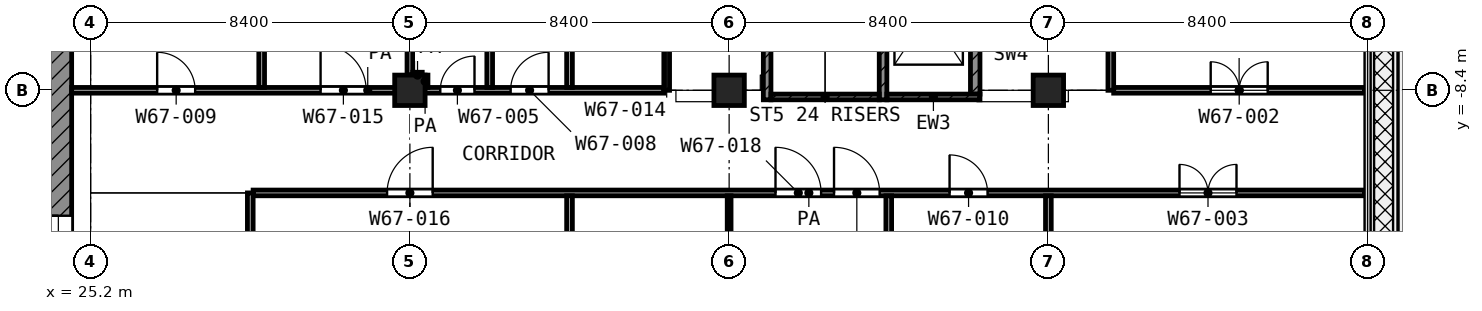
"""IFC4 building model, lengths in metres.
Left out: names, types, materials, properties, quantities, classifications, styles, units other than length and angle.
Written with IfcOpenShell. Run it as: python <this file> out.ifc"""

import sys

from ifc_helpers import new_model, si_unit, direction, frame, frame_2d, origin, origin_2d, place, context, subcontext, project, spatial, rectangle, extrude, element, fill, save


model = new_model("IFC4")
c1 = context("Model", 3, precision=1e-05, world=origin(), true_north=direction((0.0, 1.0)))
c2 = subcontext(c1, "Body", "Model", "MODEL_VIEW")
j1 = project(units=[si_unit("LENGTHUNIT", "METRE"), si_unit("PLANEANGLEUNIT", "RADIAN")], contexts=[c1])
p1 = place(None, origin())
s1 = spatial("IfcSite", under=j1, at=p1, CompositionType="ELEMENT")
p2 = place(p1, origin())
s2 = spatial("IfcBuilding", under=s1, at=p2, CompositionType="ELEMENT")
p3 = place(p2, frame((0.0, 0.0, 311.2)))
s3 = spatial("IfcBuildingStorey", under=s2, at=p3, CompositionType="ELEMENT", Elevation=311.2)
for number, where, z_axis, x_axis in (
    (1, (33.6, -8.4, 0.0), (0.0, 0.0, 1.0), (1.0, 0.0, 0.0)),
    (2, (42.0, -8.4, 0.0), (0.0, 0.0, 1.0), (1.0, 0.0, 0.0)),
    (3, (50.4, -8.4, 0.0), (0.0, 0.0, 1.0), (1.0, 0.0, 0.0)),
):
    element("IfcColumn", number, at=place(p3, frame(where, z_axis=z_axis, x_axis=x_axis)), inside=s3, PredefinedType="COLUMN", context=c2, shape_type="SweptSolid", body=[
        extrude(rectangle(XDim=0.8, YDim=0.8, at=origin_2d()), origin(), (0.0, 0.0, 1.0), 4.2),
    ])
p4 = place(p3, frame((24.35, -24.0, 0.0), z_axis=(0.0, 0.0, 1.0), x_axis=(0.0, 1.0, 0.0)))
e4 = element("IfcWall", 4, at=p4, inside=s3, PredefinedType="SHEAR", context=c2, shape_type="SweptSolid", body=[
    extrude(rectangle(XDim=18.6, YDim=0.7, at=frame_2d((9.3, 0.0))), origin(), (0.0, 0.0, 1.0), 3.6),
])
p5 = place(p4, frame((10.5, 0.0, 0.0)))
e5 = element("IfcOpeningElement", 5, at=p5, cuts=e4, PredefinedType="OPENING", context=c2, shape_type="SweptSolid", body=[
    extrude(rectangle(XDim=1.8, YDim=2.1, at=frame_2d((0.9, 1.05))), frame((0.0, 0.36, 0.0), z_axis=(0.0, -1.0, 0.0), x_axis=(1.0, 0.0, 0.0)), (0.0, 0.0, 1.0), 0.72),
])
p6 = place(p3, frame((43.0, -8.65, 0.0), z_axis=(0.0, 0.0, 1.0), x_axis=(0.0, 1.0, 0.0)))
e6 = element("IfcWall", 6, at=p6, inside=s3, PredefinedType="SHEAR", context=c2, shape_type="SweptSolid", body=[
    extrude(rectangle(XDim=8.35, YDim=0.2, at=frame_2d((4.175, 0.0))), origin(), (0.0, 0.0, 1.0), 3.6),
])
p7 = place(p6, frame((7.0, 0.0, 0.0)))
e7 = element("IfcOpeningElement", 7, at=p7, cuts=e6, PredefinedType="OPENING", context=c2, shape_type="SweptSolid", body=[
    extrude(rectangle(XDim=1.1, YDim=2.1, at=frame_2d((0.55, 1.05))), frame((0.0, 0.11, 0.0), z_axis=(0.0, -1.0, 0.0), x_axis=(1.0, 0.0, 0.0)), (0.0, 0.0, 1.0), 0.22),
])
p8 = place(p3, frame((46.05, -8.65, 0.0), z_axis=(0.0, 0.0, 1.0), x_axis=(0.0, 1.0, 0.0)))
e8 = element("IfcWall", 8, at=p8, inside=s3, PredefinedType="SHEAR", context=c2, shape_type="SweptSolid", body=[
    extrude(rectangle(XDim=8.35, YDim=0.2, at=frame_2d((4.175, 0.0))), origin(), (0.0, 0.0, 1.0), 3.6),
])
p9 = place(p8, frame((7.0, 0.0, 0.0)))
e9 = element("IfcOpeningElement", 9, at=p9, cuts=e8, PredefinedType="OPENING", context=c2, shape_type="SweptSolid", body=[
    extrude(rectangle(XDim=1.1, YDim=2.1, at=frame_2d((0.55, 1.05))), frame((0.0, 0.11, 0.0), z_axis=(0.0, -1.0, 0.0), x_axis=(1.0, 0.0, 0.0)), (0.0, 0.0, 1.0), 0.22),
])
p10 = place(p3, frame((43.1, -8.575, 0.0), z_axis=(0.0, 0.0, 1.0), x_axis=(1.0, 0.0, 0.0)))
e10 = element("IfcWall", 10, at=p10, inside=s3, PredefinedType="SHEAR", context=c2, shape_type="SweptSolid", body=[
    extrude(rectangle(XDim=2.85, YDim=0.15, at=frame_2d((1.425, 0.0))), origin(), (0.0, 0.0, 1.0), 3.6),
])
p11 = place(p3, frame((46.15, -8.575, 0.0), z_axis=(0.0, 0.0, 1.0), x_axis=(1.0, 0.0, 0.0)))
e11 = element("IfcWall", 11, at=p11, inside=s3, PredefinedType="SHEAR", context=c2, shape_type="SweptSolid", body=[
    extrude(rectangle(XDim=2.45, YDim=0.15, at=frame_2d((1.225, 0.0))), origin(), (0.0, 0.0, 1.0), 3.6),
])
p12 = place(p3, frame((48.475, -8.5, 0.0), z_axis=(0.0, 0.0, 1.0), x_axis=(0.0, 1.0, 0.0)))
e12 = element("IfcWall", 12, at=p12, inside=s3, PredefinedType="SHEAR", context=c2, shape_type="SweptSolid", body=[
    extrude(rectangle(XDim=3.475, YDim=0.25, at=frame_2d((1.738, 0.0))), origin(), (0.0, 0.0, 1.0), 3.6),
])
p13 = place(p3, frame((42.0, -20.35, 0.0), z_axis=(0.0, 0.0, 1.0), x_axis=(0.0, 1.0, 0.0)))
e13 = element("IfcWall", 13, at=p13, inside=s3, PredefinedType="PARTITIONING", context=c2, shape_type="SweptSolid", body=[
    extrude(rectangle(XDim=9.175, YDim=0.1, at=frame_2d((4.587, 0.0))), origin(), (0.0, 0.0, 1.0), 3.6),
])
p14 = place(p13, frame((4.1, 0.0, 0.0)))
e14 = element("IfcOpeningElement", 14, at=p14, cuts=e13, PredefinedType="OPENING", context=c2, shape_type="SweptSolid", body=[
    extrude(rectangle(XDim=1.0, YDim=2.1, at=frame_2d((0.5, 1.05))), frame((0.0, 0.06, 0.0), z_axis=(0.0, -1.0, 0.0), x_axis=(1.0, 0.0, 0.0)), (0.0, 0.0, 1.0), 0.12),
])
p15 = place(p3, frame((29.475, -11.1, 0.0), z_axis=(0.0, 0.0, 1.0), x_axis=(1.0, 0.0, 0.0)))
e15 = element("IfcWall", 15, at=p15, inside=s3, PredefinedType="PARTITIONING", context=c2, shape_type="SweptSolid", body=[
    extrude(rectangle(XDim=29.245, YDim=0.15, at=frame_2d((14.623, 0.0))), origin(), (0.0, 0.0, 1.0), 3.6),
])
p16 = place(p15, frame((3.525, 0.0, 0.0)))
e16 = element("IfcOpeningElement", 16, at=p16, cuts=e15, PredefinedType="OPENING", context=c2, shape_type="SweptSolid", body=[
    extrude(rectangle(XDim=1.2, YDim=2.1, at=frame_2d((0.6, 1.05))), frame((0.0, 0.085, 0.0), z_axis=(0.0, -1.0, 0.0), x_axis=(1.0, 0.0, 0.0)), (0.0, 0.0, 1.0), 0.17),
])
p17 = place(p15, frame((15.285, 0.0, 0.0)))
e17 = element("IfcOpeningElement", 17, at=p17, cuts=e15, PredefinedType="OPENING", context=c2, shape_type="SweptSolid", body=[
    extrude(rectangle(XDim=1.2, YDim=2.1, at=frame_2d((0.6, 1.05))), frame((0.0, 0.085, 0.0), z_axis=(0.0, -1.0, 0.0), x_axis=(1.0, 0.0, 0.0)), (0.0, 0.0, 1.0), 0.17),
])
p18 = place(p15, frame((13.745, 0.0, 0.0)))
e18 = element("IfcOpeningElement", 18, at=p18, cuts=e15, PredefinedType="OPENING", context=c2, shape_type="SweptSolid", body=[
    extrude(rectangle(XDim=1.2, YDim=2.1, at=frame_2d((0.6, 1.05))), frame((0.0, 0.085, 0.0), z_axis=(0.0, -1.0, 0.0), x_axis=(1.0, 0.0, 0.0)), (0.0, 0.0, 1.0), 0.17),
])
p19 = place(p15, frame((18.325, 0.0, 0.0)))
e19 = element("IfcOpeningElement", 19, at=p19, cuts=e15, PredefinedType="OPENING", context=c2, shape_type="SweptSolid", body=[
    extrude(rectangle(XDim=1.0, YDim=2.1, at=frame_2d((0.5, 1.05))), frame((0.0, 0.085, 0.0), z_axis=(0.0, -1.0, 0.0), x_axis=(1.0, 0.0, 0.0)), (0.0, 0.0, 1.0), 0.17),
])
p20 = place(p15, frame((24.375, 0.0, 0.0)))
e20 = element("IfcOpeningElement", 20, at=p20, cuts=e15, PredefinedType="OPENING", context=c2, shape_type="SweptSolid", body=[
    extrude(rectangle(XDim=1.5, YDim=2.1, at=frame_2d((0.75, 1.05))), frame((0.0, 0.085, 0.0), z_axis=(0.0, -1.0, 0.0), x_axis=(1.0, 0.0, 0.0)), (0.0, 0.0, 1.0), 0.17),
])
p21 = place(p3, frame((24.7, -8.4, 0.0), z_axis=(0.0, 0.0, 1.0), x_axis=(1.0, 0.0, 0.0)))
e21 = element("IfcWall", 21, at=p21, inside=s3, PredefinedType="PARTITIONING", context=c2, shape_type="SweptSolid", body=[
    extrude(rectangle(XDim=15.582, YDim=0.15, at=frame_2d((7.791, 0.0))), origin(), (0.0, 0.0, 1.0), 3.6),
])
p22 = place(p21, frame((2.25, 0.0, 0.0)))
e22 = element("IfcOpeningElement", 22, at=p22, cuts=e21, PredefinedType="OPENING", context=c2, shape_type="SweptSolid", body=[
    extrude(rectangle(XDim=1.0, YDim=2.1, at=frame_2d((0.5, 1.05))), frame((0.0, 0.085, 0.0), z_axis=(0.0, -1.0, 0.0), x_axis=(1.0, 0.0, 0.0)), (0.0, 0.0, 1.0), 0.17),
])
p23 = place(p21, frame((6.55, 0.0, 0.0)))
e23 = element("IfcOpeningElement", 23, at=p23, cuts=e21, PredefinedType="OPENING", context=c2, shape_type="SweptSolid", body=[
    extrude(rectangle(XDim=1.2, YDim=2.1, at=frame_2d((0.6, 1.05))), frame((0.0, 0.085, 0.0), z_axis=(0.0, -1.0, 0.0), x_axis=(1.0, 0.0, 0.0)), (0.0, 0.0, 1.0), 0.17),
])
p24 = place(p21, frame((9.7, 0.0, 0.0)))
e24 = element("IfcOpeningElement", 24, at=p24, cuts=e21, PredefinedType="OPENING", context=c2, shape_type="SweptSolid", body=[
    extrude(rectangle(XDim=0.9, YDim=2.1, at=frame_2d((0.45, 1.05))), frame((0.0, 0.085, 0.0), z_axis=(0.0, -1.0, 0.0), x_axis=(1.0, 0.0, 0.0)), (0.0, 0.0, 1.0), 0.17),
])
p25 = place(p21, frame((11.55, 0.0, 0.0)))
e25 = element("IfcOpeningElement", 25, at=p25, cuts=e21, PredefinedType="OPENING", context=c2, shape_type="SweptSolid", body=[
    extrude(rectangle(XDim=1.0, YDim=2.1, at=frame_2d((0.5, 1.05))), frame((0.0, 0.085, 0.0), z_axis=(0.0, -1.0, 0.0), x_axis=(1.0, 0.0, 0.0)), (0.0, 0.0, 1.0), 0.17),
])
p26 = place(p3, frame((52.118, -8.4, 0.0), z_axis=(0.0, 0.0, 1.0), x_axis=(1.0, 0.0, 0.0)))
e26 = element("IfcWall", 26, at=p26, inside=s3, PredefinedType="PARTITIONING", context=c2, shape_type="SweptSolid", body=[
    extrude(rectangle(XDim=6.602, YDim=0.15, at=frame_2d((3.301, 0.0))), origin(), (0.0, 0.0, 1.0), 3.6),
])
p27 = place(p26, frame((2.553, 0.0, 0.0)))
e27 = element("IfcOpeningElement", 27, at=p27, cuts=e26, PredefinedType="OPENING", context=c2, shape_type="SweptSolid", body=[
    extrude(rectangle(XDim=1.5, YDim=2.1, at=frame_2d((0.75, 1.05))), frame((0.0, 0.085, 0.0), z_axis=(0.0, -1.0, 0.0), x_axis=(1.0, 0.0, 0.0)), (0.0, 0.0, 1.0), 0.17),
])
p28 = place(p3, frame((33.677, -8.0, 0.0), z_axis=(0.0, 0.0, 1.0), x_axis=(1.0, 0.0, 0.0)))
e28 = element("IfcWall", 28, at=p28, inside=s3, PredefinedType="PARTITIONING", context=c2, shape_type="SweptSolid", body=[
    extrude(rectangle(XDim=0.248, YDim=0.15, at=frame_2d((0.124, 0.0))), origin(), (0.0, 0.0, 1.0), 3.6),
])
p29 = place(p3, frame((29.4, -31.198, 0.0), z_axis=(0.0, 0.0, 1.0), x_axis=(0.0, 1.0, 0.0)))
e29 = element("IfcWall", 29, at=p29, inside=s3, PredefinedType="PARTITIONING", context=c2, shape_type="SweptSolid", body=[
    extrude(rectangle(XDim=20.098, YDim=0.15, at=frame_2d((10.049, 0.0))), origin(), (0.0, 0.0, 1.0), 3.6),
])
p30 = place(p3, frame((29.7, -8.325, 0.0), z_axis=(0.0, 0.0, 1.0), x_axis=(0.0, 1.0, 0.0)))
e30 = element("IfcWall", 30, at=p30, inside=s3, PredefinedType="PARTITIONING", context=c2, shape_type="SweptSolid", body=[
    extrude(rectangle(XDim=8.245, YDim=0.15, at=frame_2d((4.123, 0.0))), origin(), (0.0, 0.0, 1.0), 3.6),
])
p31 = place(p3, frame((33.6, -7.998, 0.0), z_axis=(0.0, 0.0, 1.0), x_axis=(0.0, 1.0, 0.0)))
e31 = element("IfcWall", 31, at=p31, inside=s3, PredefinedType="PARTITIONING", context=c2, shape_type="SweptSolid", body=[
    extrude(rectangle(XDim=7.62, YDim=0.15, at=frame_2d((3.81, 0.0))), origin(), (0.0, 0.0, 1.0), 3.6),
])
p32 = place(p3, frame((34.0, -8.325, 0.0), z_axis=(0.0, 0.0, 1.0), x_axis=(0.0, 1.0, 0.0)))
e32 = element("IfcWall", 32, at=p32, inside=s3, PredefinedType="PARTITIONING", context=c2, shape_type="SweptSolid", body=[
    extrude(rectangle(XDim=0.325, YDim=0.15, at=frame_2d((0.163, 0.0))), origin(), (0.0, 0.0, 1.0), 3.6),
])
p33 = place(p3, frame((35.7, -8.325, 0.0), z_axis=(0.0, 0.0, 1.0), x_axis=(0.0, 1.0, 0.0)))
e33 = element("IfcWall", 33, at=p33, inside=s3, PredefinedType="PARTITIONING", context=c2, shape_type="SweptSolid", body=[
    extrude(rectangle(XDim=8.245, YDim=0.15, at=frame_2d((4.123, 0.0))), origin(), (0.0, 0.0, 1.0), 3.6),
])
p34 = place(p3, frame((37.8, -25.12, 0.0), z_axis=(0.0, 0.0, 1.0), x_axis=(0.0, 1.0, 0.0)))
e34 = element("IfcWall", 34, at=p34, inside=s3, PredefinedType="PARTITIONING", context=c2, shape_type="SweptSolid", body=[
    extrude(rectangle(XDim=13.945, YDim=0.15, at=frame_2d((6.973, 0.0))), origin(), (0.0, 0.0, 1.0), 3.6),
])
p35 = place(p3, frame((37.8, -8.325, 0.0), z_axis=(0.0, 0.0, 1.0), x_axis=(0.0, 1.0, 0.0)))
e35 = element("IfcWall", 35, at=p35, inside=s3, PredefinedType="PARTITIONING", context=c2, shape_type="SweptSolid", body=[
    extrude(rectangle(XDim=8.245, YDim=0.15, at=frame_2d((4.123, 0.0))), origin(), (0.0, 0.0, 1.0), 3.6),
])
p36 = place(p3, frame((40.357, -8.4, 0.0), z_axis=(0.0, 0.0, 1.0), x_axis=(0.0, 1.0, 0.0)))
e36 = element("IfcWall", 36, at=p36, inside=s3, PredefinedType="PARTITIONING", context=c2, shape_type="SweptSolid", body=[
    extrude(rectangle(XDim=8.048, YDim=0.15, at=frame_2d((4.024, 0.0))), origin(), (0.0, 0.0, 1.0), 3.6),
])
p37 = place(p36, frame((3.524, 0.0, 0.0)))
e37 = element("IfcOpeningElement", 37, at=p37, cuts=e36, PredefinedType="OPENING", context=c2, shape_type="SweptSolid", body=[
    extrude(rectangle(XDim=1.0, YDim=2.1, at=frame_2d((0.5, 1.05))), frame((0.0, 0.085, 0.0), z_axis=(0.0, -1.0, 0.0), x_axis=(1.0, 0.0, 0.0)), (0.0, 0.0, 1.0), 0.17),
])
for number, where, z_axis, x_axis in (
    (38, (46.2, -25.12, 0.0), (0.0, 0.0, 1.0), (0.0, 1.0, 0.0)),
    (39, (50.4, -25.12, 0.0), (0.0, 0.0, 1.0), (0.0, 1.0, 0.0)),
):
    element("IfcWall", number, at=place(p3, frame(where, z_axis=z_axis, x_axis=x_axis)), inside=s3, PredefinedType="PARTITIONING", context=c2, shape_type="SweptSolid", body=[
        extrude(rectangle(XDim=13.945, YDim=0.15, at=frame_2d((6.973, 0.0))), origin(), (0.0, 0.0, 1.0), 3.6),
    ])
p38 = place(p3, frame((52.043, -8.4, 0.0), z_axis=(0.0, 0.0, 1.0), x_axis=(0.0, 1.0, 0.0)))
e40 = element("IfcWall", 40, at=p38, inside=s3, PredefinedType="PARTITIONING", context=c2, shape_type="SweptSolid", body=[
    extrude(rectangle(XDim=6.548, YDim=0.15, at=frame_2d((3.274, 0.0))), origin(), (0.0, 0.0, 1.0), 3.6),
])
p39 = place(p5, origin())
e41 = element("IfcDoor", 41, at=p39, inside=s3, OperationType="DOUBLE_DOOR_SINGLE_SWING", PredefinedType="DOOR", context=c2, shape_type="SweptSolid", body=[
    extrude(rectangle(XDim=1.8, YDim=2.1, at=frame_2d((0.9, 1.05))), frame((0.0, 0.025, 0.0), z_axis=(0.0, -1.0, 0.0), x_axis=(1.0, 0.0, 0.0)), (0.0, 0.0, 1.0), 0.05),
])
fill(e5, e41)
p40 = place(p22, origin())
e42 = element("IfcDoor", 42, at=p40, inside=s3, OperationType="SINGLE_SWING_LEFT", PredefinedType="DOOR", context=c2, shape_type="SweptSolid", body=[
    extrude(rectangle(XDim=1.0, YDim=2.1, at=frame_2d((0.5, 1.05))), frame((0.0, 0.025, 0.0), z_axis=(0.0, -1.0, 0.0), x_axis=(1.0, 0.0, 0.0)), (0.0, 0.0, 1.0), 0.05),
])
fill(e22, e42)
p41 = place(p23, origin())
e43 = element("IfcDoor", 43, at=p41, inside=s3, OperationType="SINGLE_SWING_LEFT", PredefinedType="DOOR", context=c2, shape_type="SweptSolid", body=[
    extrude(rectangle(XDim=1.2, YDim=2.1, at=frame_2d((0.6, 1.05))), frame((0.0, 0.025, 0.0), z_axis=(0.0, -1.0, 0.0), x_axis=(1.0, 0.0, 0.0)), (0.0, 0.0, 1.0), 0.05),
])
fill(e23, e43)
p42 = place(p27, origin())
e44 = element("IfcDoor", 44, at=p42, inside=s3, OperationType="DOUBLE_DOOR_SINGLE_SWING", PredefinedType="DOOR", context=c2, shape_type="SweptSolid", body=[
    extrude(rectangle(XDim=1.5, YDim=2.1, at=frame_2d((0.75, 1.05))), frame((0.0, 0.025, 0.0), z_axis=(0.0, -1.0, 0.0), x_axis=(1.0, 0.0, 0.0)), (0.0, 0.0, 1.0), 0.05),
])
fill(e27, e44)
p43 = place(p16, origin())
e45 = element("IfcDoor", 45, at=p43, inside=s3, OperationType="SINGLE_SWING_RIGHT", PredefinedType="DOOR", context=c2, shape_type="SweptSolid", body=[
    extrude(rectangle(XDim=1.2, YDim=2.1, at=frame_2d((0.6, 1.05))), frame((0.0, 0.025, 0.0), z_axis=(0.0, -1.0, 0.0), x_axis=(1.0, 0.0, 0.0)), (0.0, 0.0, 1.0), 0.05),
])
fill(e16, e45)
p44 = place(p17, origin())
e46 = element("IfcDoor", 46, at=p44, inside=s3, OperationType="SINGLE_SWING_LEFT", PredefinedType="DOOR", context=c2, shape_type="SweptSolid", body=[
    extrude(rectangle(XDim=1.2, YDim=2.1, at=frame_2d((0.6, 1.05))), frame((0.0, 0.025, 0.0), z_axis=(0.0, -1.0, 0.0), x_axis=(1.0, 0.0, 0.0)), (0.0, 0.0, 1.0), 0.05),
])
fill(e17, e46)
p45 = place(p18, origin())
e47 = element("IfcDoor", 47, at=p45, inside=s3, OperationType="SINGLE_SWING_LEFT", PredefinedType="DOOR", context=c2, shape_type="SweptSolid", body=[
    extrude(rectangle(XDim=1.2, YDim=2.1, at=frame_2d((0.6, 1.05))), frame((0.0, 0.025, 0.0), z_axis=(0.0, -1.0, 0.0), x_axis=(1.0, 0.0, 0.0)), (0.0, 0.0, 1.0), 0.05),
])
fill(e18, e47)
p46 = place(p19, origin())
e48 = element("IfcDoor", 48, at=p46, inside=s3, OperationType="SINGLE_SWING_LEFT", PredefinedType="DOOR", context=c2, shape_type="SweptSolid", body=[
    extrude(rectangle(XDim=1.0, YDim=2.1, at=frame_2d((0.5, 1.05))), frame((0.0, 0.025, 0.0), z_axis=(0.0, -1.0, 0.0), x_axis=(1.0, 0.0, 0.0)), (0.0, 0.0, 1.0), 0.05),
])
fill(e19, e48)
p47 = place(p20, origin())
e49 = element("IfcDoor", 49, at=p47, inside=s3, OperationType="DOUBLE_DOOR_SINGLE_SWING", PredefinedType="DOOR", context=c2, shape_type="SweptSolid", body=[
    extrude(rectangle(XDim=1.5, YDim=2.1, at=frame_2d((0.75, 1.05))), frame((0.0, 0.025, 0.0), z_axis=(0.0, -1.0, 0.0), x_axis=(1.0, 0.0, 0.0)), (0.0, 0.0, 1.0), 0.05),
])
fill(e20, e49)
p48 = place(p24, origin())
e50 = element("IfcDoor", 50, at=p48, inside=s3, OperationType="SINGLE_SWING_RIGHT", PredefinedType="DOOR", context=c2, shape_type="SweptSolid", body=[
    extrude(rectangle(XDim=0.9, YDim=2.1, at=frame_2d((0.45, 1.05))), frame((0.0, 0.025, 0.0), z_axis=(0.0, -1.0, 0.0), x_axis=(1.0, 0.0, 0.0)), (0.0, 0.0, 1.0), 0.05),
])
fill(e24, e50)
p49 = place(p25, origin())
e51 = element("IfcDoor", 51, at=p49, inside=s3, OperationType="SINGLE_SWING_RIGHT", PredefinedType="DOOR", context=c2, shape_type="SweptSolid", body=[
    extrude(rectangle(XDim=1.0, YDim=2.1, at=frame_2d((0.5, 1.05))), frame((0.0, 0.025, 0.0), z_axis=(0.0, -1.0, 0.0), x_axis=(1.0, 0.0, 0.0)), (0.0, 0.0, 1.0), 0.05),
])
fill(e25, e51)
save(model, sys.argv[1])
